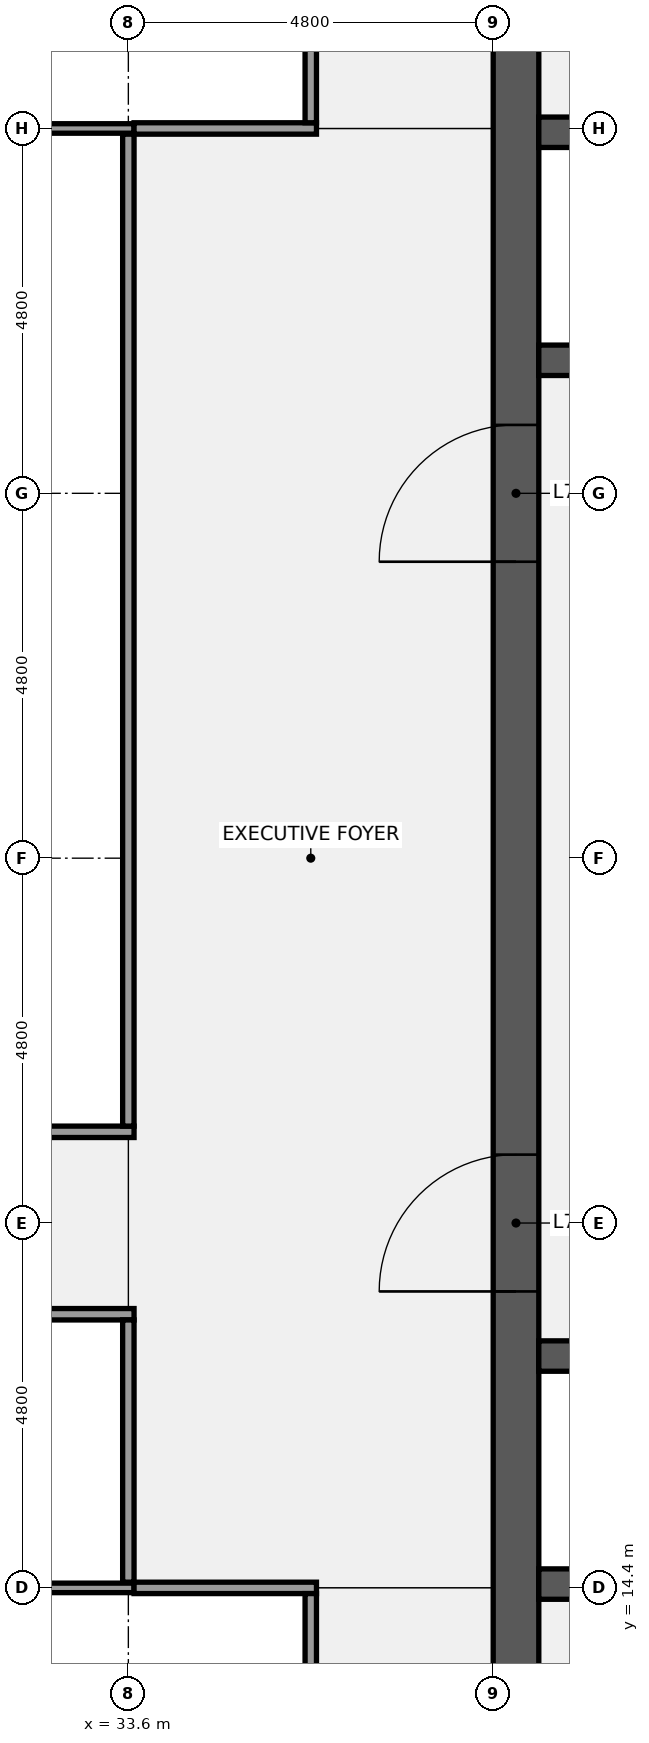
"""IFC4 building model, lengths in metres.
Left out: names, types, materials, properties, quantities, classifications, styles, units other than length and angle.
Written with IfcOpenShell. Run it as: python <this file> out.ifc"""

import sys

from ifc_helpers import new_model, si_unit, direction, frame, frame_2d, origin, place, context, subcontext, project, spatial, rectangle, extrude, element, fill, save


model = new_model("IFC4")
c1 = context("Model", 3, precision=1e-05, world=origin(), true_north=direction((0.0, 1.0)))
c2 = subcontext(c1, "Body", "Model", "MODEL_VIEW")
j1 = project(units=[si_unit("LENGTHUNIT", "METRE"), si_unit("PLANEANGLEUNIT", "RADIAN")], contexts=[c1])
p1 = place(None, origin())
s1 = spatial("IfcSite", under=j1, at=p1, CompositionType="ELEMENT")
p2 = place(p1, origin())
s2 = spatial("IfcBuilding", under=s1, at=p2, CompositionType="ELEMENT")
p3 = place(p2, frame((0.0, 0.0, 330.3)))
s3 = spatial("IfcBuildingStorey", under=s2, at=p3, CompositionType="ELEMENT", Elevation=330.3)
p4 = place(p3, frame((38.7, 9.6, 0.0), z_axis=(0.0, 0.0, 1.0), x_axis=(0.0, 1.0, 0.0)))
e1 = element("IfcWall", 1, at=p4, inside=s3, PredefinedType="SHEAR", context=c2, shape_type="SweptSolid", body=[
    extrude(rectangle(XDim=28.8, YDim=0.6, at=frame_2d((14.4, 0.0))), origin(), (0.0, 0.0, 1.0), 3.84),
])
p5 = place(p4, frame((8.7, 0.0, 0.0)))
e2 = element("IfcOpeningElement", 2, at=p5, cuts=e1, PredefinedType="OPENING", context=c2, shape_type="SweptSolid", body=[
    extrude(rectangle(XDim=1.8, YDim=2.1, at=frame_2d((0.9, 1.05))), frame((0.0, 0.31, 0.0), z_axis=(0.0, -1.0, 0.0), x_axis=(1.0, 0.0, 0.0)), (0.0, 0.0, 1.0), 0.62),
])
p6 = place(p4, frame((18.3, 0.0, 0.0)))
e3 = element("IfcOpeningElement", 3, at=p6, cuts=e1, PredefinedType="OPENING", context=c2, shape_type="SweptSolid", body=[
    extrude(rectangle(XDim=1.8, YDim=2.1, at=frame_2d((0.9, 1.05))), frame((0.0, 0.31, 0.0), z_axis=(0.0, -1.0, 0.0), x_axis=(1.0, 0.0, 0.0)), (0.0, 0.0, 1.0), 0.62),
])
p7 = place(p3, frame((39.0, 14.45, 0.0), z_axis=(0.0, 0.0, 1.0), x_axis=(1.0, 0.0, 0.0)))
e4 = element("IfcWall", 4, at=p7, inside=s3, PredefinedType="SHEAR", context=c2, shape_type="SweptSolid", body=[
    extrude(rectangle(XDim=18.0, YDim=0.4, at=frame_2d((9.0, 0.0))), origin(), (0.0, 0.0, 1.0), 3.84),
])
p8 = place(p3, frame((39.0, 17.45, 0.0), z_axis=(0.0, 0.0, 1.0), x_axis=(1.0, 0.0, 0.0)))
e5 = element("IfcWall", 5, at=p8, inside=s3, PredefinedType="SHEAR", context=c2, shape_type="SweptSolid", body=[
    extrude(rectangle(XDim=18.0, YDim=0.4, at=frame_2d((9.0, 0.0))), origin(), (0.0, 0.0, 1.0), 3.84),
])
p9 = place(p8, frame((15.137, 0.0, 0.0)))
e6 = element("IfcOpeningElement", 6, at=p9, cuts=e5, PredefinedType="OPENING", context=c2, shape_type="SweptSolid", body=[
    extrude(rectangle(XDim=1.0, YDim=2.1, at=frame_2d((0.5, 1.05))), frame((0.0, 0.21, 0.0), z_axis=(0.0, -1.0, 0.0), x_axis=(1.0, 0.0, 0.0)), (0.0, 0.0, 1.0), 0.42),
])
p10 = place(p8, frame((10.9, 0.0, 0.0)))
e7 = element("IfcOpeningElement", 7, at=p10, cuts=e5, PredefinedType="OPENING", context=c2, shape_type="SweptSolid", body=[
    extrude(rectangle(XDim=1.0, YDim=2.1, at=frame_2d((0.5, 1.05))), frame((0.0, 0.21, 0.0), z_axis=(0.0, -1.0, 0.0), x_axis=(1.0, 0.0, 0.0)), (0.0, 0.0, 1.0), 0.42),
])
p11 = place(p8, frame((7.6, 0.0, 0.0)))
e8 = element("IfcOpeningElement", 8, at=p11, cuts=e5, PredefinedType="OPENING", context=c2, shape_type="SweptSolid", body=[
    extrude(rectangle(XDim=1.0, YDim=2.1, at=frame_2d((0.5, 1.05))), frame((0.0, 0.21, 0.0), z_axis=(0.0, -1.0, 0.0), x_axis=(1.0, 0.0, 0.0)), (0.0, 0.0, 1.0), 0.42),
])
p12 = place(p8, frame((4.9, 0.0, 0.0)))
e9 = element("IfcOpeningElement", 9, at=p12, cuts=e5, PredefinedType="OPENING", context=c2, shape_type="SweptSolid", body=[
    extrude(rectangle(XDim=1.0, YDim=2.1, at=frame_2d((0.5, 1.05))), frame((0.0, 0.21, 0.0), z_axis=(0.0, -1.0, 0.0), x_axis=(1.0, 0.0, 0.0)), (0.0, 0.0, 1.0), 0.42),
])
p13 = place(p8, frame((1.562, 0.0, 0.0)))
e10 = element("IfcOpeningElement", 10, at=p13, cuts=e5, PredefinedType="OPENING", context=c2, shape_type="SweptSolid", body=[
    extrude(rectangle(XDim=1.0, YDim=2.1, at=frame_2d((0.5, 1.05))), frame((0.0, 0.21, 0.0), z_axis=(0.0, -1.0, 0.0), x_axis=(1.0, 0.0, 0.0)), (0.0, 0.0, 1.0), 0.42),
])
p14 = place(p3, frame((39.0, 30.55, 0.0), z_axis=(0.0, 0.0, 1.0), x_axis=(1.0, 0.0, 0.0)))
e11 = element("IfcWall", 11, at=p14, inside=s3, PredefinedType="SHEAR", context=c2, shape_type="SweptSolid", body=[
    extrude(rectangle(XDim=18.0, YDim=0.4, at=frame_2d((9.0, 0.0))), origin(), (0.0, 0.0, 1.0), 3.84),
])
p15 = place(p14, frame((15.2, 0.0, 0.0)))
e12 = element("IfcOpeningElement", 12, at=p15, cuts=e11, PredefinedType="OPENING", context=c2, shape_type="SweptSolid", body=[
    extrude(rectangle(XDim=1.2, YDim=2.1, at=frame_2d((0.6, 1.05))), frame((0.0, 0.21, 0.0), z_axis=(0.0, -1.0, 0.0), x_axis=(1.0, 0.0, 0.0)), (0.0, 0.0, 1.0), 0.42),
])
p16 = place(p14, frame((12.6, 0.0, 0.0)))
e13 = element("IfcOpeningElement", 13, at=p16, cuts=e11, PredefinedType="OPENING", context=c2, shape_type="SweptSolid", body=[
    extrude(rectangle(XDim=1.2, YDim=2.1, at=frame_2d((0.6, 1.05))), frame((0.0, 0.21, 0.0), z_axis=(0.0, -1.0, 0.0), x_axis=(1.0, 0.0, 0.0)), (0.0, 0.0, 1.0), 0.42),
])
p17 = place(p14, frame((10.0, 0.0, 0.0)))
e14 = element("IfcOpeningElement", 14, at=p17, cuts=e11, PredefinedType="OPENING", context=c2, shape_type="SweptSolid", body=[
    extrude(rectangle(XDim=1.2, YDim=2.1, at=frame_2d((0.6, 1.05))), frame((0.0, 0.21, 0.0), z_axis=(0.0, -1.0, 0.0), x_axis=(1.0, 0.0, 0.0)), (0.0, 0.0, 1.0), 0.42),
])
p18 = place(p14, frame((6.8, 0.0, 0.0)))
e15 = element("IfcOpeningElement", 15, at=p18, cuts=e11, PredefinedType="OPENING", context=c2, shape_type="SweptSolid", body=[
    extrude(rectangle(XDim=1.2, YDim=2.1, at=frame_2d((0.6, 1.05))), frame((0.0, 0.21, 0.0), z_axis=(0.0, -1.0, 0.0), x_axis=(1.0, 0.0, 0.0)), (0.0, 0.0, 1.0), 0.42),
])
p19 = place(p14, frame((4.2, 0.0, 0.0)))
e16 = element("IfcOpeningElement", 16, at=p19, cuts=e11, PredefinedType="OPENING", context=c2, shape_type="SweptSolid", body=[
    extrude(rectangle(XDim=1.2, YDim=2.1, at=frame_2d((0.6, 1.05))), frame((0.0, 0.21, 0.0), z_axis=(0.0, -1.0, 0.0), x_axis=(1.0, 0.0, 0.0)), (0.0, 0.0, 1.0), 0.42),
])
p20 = place(p14, frame((1.6, 0.0, 0.0)))
e17 = element("IfcOpeningElement", 17, at=p20, cuts=e11, PredefinedType="OPENING", context=c2, shape_type="SweptSolid", body=[
    extrude(rectangle(XDim=1.2, YDim=2.1, at=frame_2d((0.6, 1.05))), frame((0.0, 0.21, 0.0), z_axis=(0.0, -1.0, 0.0), x_axis=(1.0, 0.0, 0.0)), (0.0, 0.0, 1.0), 0.42),
])
p21 = place(p3, frame((39.0, 33.55, 0.0), z_axis=(0.0, 0.0, 1.0), x_axis=(1.0, 0.0, 0.0)))
e18 = element("IfcWall", 18, at=p21, inside=s3, PredefinedType="SHEAR", context=c2, shape_type="SweptSolid", body=[
    extrude(rectangle(XDim=18.0, YDim=0.4, at=frame_2d((9.0, 0.0))), origin(), (0.0, 0.0, 1.0), 3.84),
])
p22 = place(p3, frame((24.075, 14.4, 0.0), z_axis=(0.0, 0.0, 1.0), x_axis=(1.0, 0.0, 0.0)))
e19 = element("IfcWall", 19, at=p22, inside=s3, PredefinedType="PARTITIONING", context=c2, shape_type="SweptSolid", body=[
    extrude(rectangle(XDim=9.6, YDim=0.125, at=frame_2d((4.8, 0.0))), origin(), (0.0, 0.0, 1.0), 2.87),
])
p23 = place(p3, frame((33.675, 14.4, 0.0), z_axis=(0.0, 0.0, 1.0), x_axis=(1.0, 0.0, 0.0)))
e20 = element("IfcWall", 20, at=p23, inside=s3, PredefinedType="PARTITIONING", context=c2, shape_type="SweptSolid", body=[
    extrude(rectangle(XDim=2.4, YDim=0.15, at=frame_2d((1.2, 0.0))), origin(), (0.0, 0.0, 1.0), 2.87),
])
p24 = place(p3, frame((23.925, 18.0, 0.0), z_axis=(0.0, 0.0, 1.0), x_axis=(1.0, 0.0, 0.0)))
e21 = element("IfcWall", 21, at=p24, inside=s3, PredefinedType="PARTITIONING", context=c2, shape_type="SweptSolid", body=[
    extrude(rectangle(XDim=9.75, YDim=0.15, at=frame_2d((4.875, 0.0))), origin(), (0.0, 0.0, 1.0), 2.87),
])
p25 = place(p24, frame((4.375, 0.0, 0.0)))
e22 = element("IfcOpeningElement", 22, at=p25, cuts=e21, PredefinedType="OPENING", context=c2, shape_type="SweptSolid", body=[
    extrude(rectangle(XDim=1.0, YDim=2.1, at=frame_2d((0.5, 1.05))), frame((0.0, 0.085, 0.0), z_axis=(0.0, -1.0, 0.0), x_axis=(1.0, 0.0, 0.0)), (0.0, 0.0, 1.0), 0.17),
])
p26 = place(p3, frame((23.925, 20.4, 0.0), z_axis=(0.0, 0.0, 1.0), x_axis=(1.0, 0.0, 0.0)))
e23 = element("IfcWall", 23, at=p26, inside=s3, PredefinedType="PARTITIONING", context=c2, shape_type="SweptSolid", body=[
    extrude(rectangle(XDim=9.75, YDim=0.15, at=frame_2d((4.875, 0.0))), origin(), (0.0, 0.0, 1.0), 2.87),
])
p27 = place(p3, frame((24.075, 33.6, 0.0), z_axis=(0.0, 0.0, 1.0), x_axis=(1.0, 0.0, 0.0)))
e24 = element("IfcWall", 24, at=p27, inside=s3, PredefinedType="PARTITIONING", context=c2, shape_type="SweptSolid", body=[
    extrude(rectangle(XDim=9.6, YDim=0.125, at=frame_2d((4.8, 0.0))), origin(), (0.0, 0.0, 1.0), 2.87),
])
p28 = place(p3, frame((33.675, 33.6, 0.0), z_axis=(0.0, 0.0, 1.0), x_axis=(1.0, 0.0, 0.0)))
e25 = element("IfcWall", 25, at=p28, inside=s3, PredefinedType="PARTITIONING", context=c2, shape_type="SweptSolid", body=[
    extrude(rectangle(XDim=2.4, YDim=0.15, at=frame_2d((1.2, 0.0))), origin(), (0.0, 0.0, 1.0), 2.87),
])
p29 = place(p3, frame((33.6, 14.475, 0.0), z_axis=(0.0, 0.0, 1.0), x_axis=(0.0, 1.0, 0.0)))
e26 = element("IfcWall", 26, at=p29, inside=s3, PredefinedType="PARTITIONING", context=c2, shape_type="SweptSolid", body=[
    extrude(rectangle(XDim=3.45, YDim=0.15, at=frame_2d((1.725, 0.0))), origin(), (0.0, 0.0, 1.0), 2.87),
])
p30 = place(p3, frame((33.6, 20.475, 0.0), z_axis=(0.0, 0.0, 1.0), x_axis=(0.0, 1.0, 0.0)))
e27 = element("IfcWall", 27, at=p30, inside=s3, PredefinedType="PARTITIONING", context=c2, shape_type="SweptSolid", body=[
    extrude(rectangle(XDim=13.05, YDim=0.15, at=frame_2d((6.525, 0.0))), origin(), (0.0, 0.0, 1.0), 2.87),
])
for number, where, z_axis, x_axis in (
    (28, (36.0, 9.675, 0.0), (0.0, 0.0, 1.0), (0.0, 1.0, 0.0)),
    (29, (36.0, 33.675, 0.0), (0.0, 0.0, 1.0), (0.0, 1.0, 0.0)),
):
    element("IfcWall", number, at=place(p3, frame(where, z_axis=z_axis, x_axis=x_axis)), inside=s3, PredefinedType="PARTITIONING", context=c2, shape_type="SweptSolid", body=[
        extrude(rectangle(XDim=4.65, YDim=0.15, at=frame_2d((2.325, 0.0))), origin(), (0.0, 0.0, 1.0), 2.87),
    ])
p31 = place(p5, origin())
e30 = element("IfcDoor", 30, at=p31, inside=s3, OperationType="DOUBLE_DOOR_SINGLE_SWING", PredefinedType="DOOR", context=c2, shape_type="SweptSolid", body=[
    extrude(rectangle(XDim=1.8, YDim=2.1, at=frame_2d((0.9, 1.05))), frame((0.0, 0.025, 0.0), z_axis=(0.0, -1.0, 0.0), x_axis=(1.0, 0.0, 0.0)), (0.0, 0.0, 1.0), 0.05),
])
fill(e2, e30)
p32 = place(p6, origin())
e31 = element("IfcDoor", 31, at=p32, inside=s3, OperationType="DOUBLE_DOOR_SINGLE_SWING", PredefinedType="DOOR", context=c2, shape_type="SweptSolid", body=[
    extrude(rectangle(XDim=1.8, YDim=2.1, at=frame_2d((0.9, 1.05))), frame((0.0, 0.025, 0.0), z_axis=(0.0, -1.0, 0.0), x_axis=(1.0, 0.0, 0.0)), (0.0, 0.0, 1.0), 0.05),
])
fill(e3, e31)
save(model, sys.argv[1])
